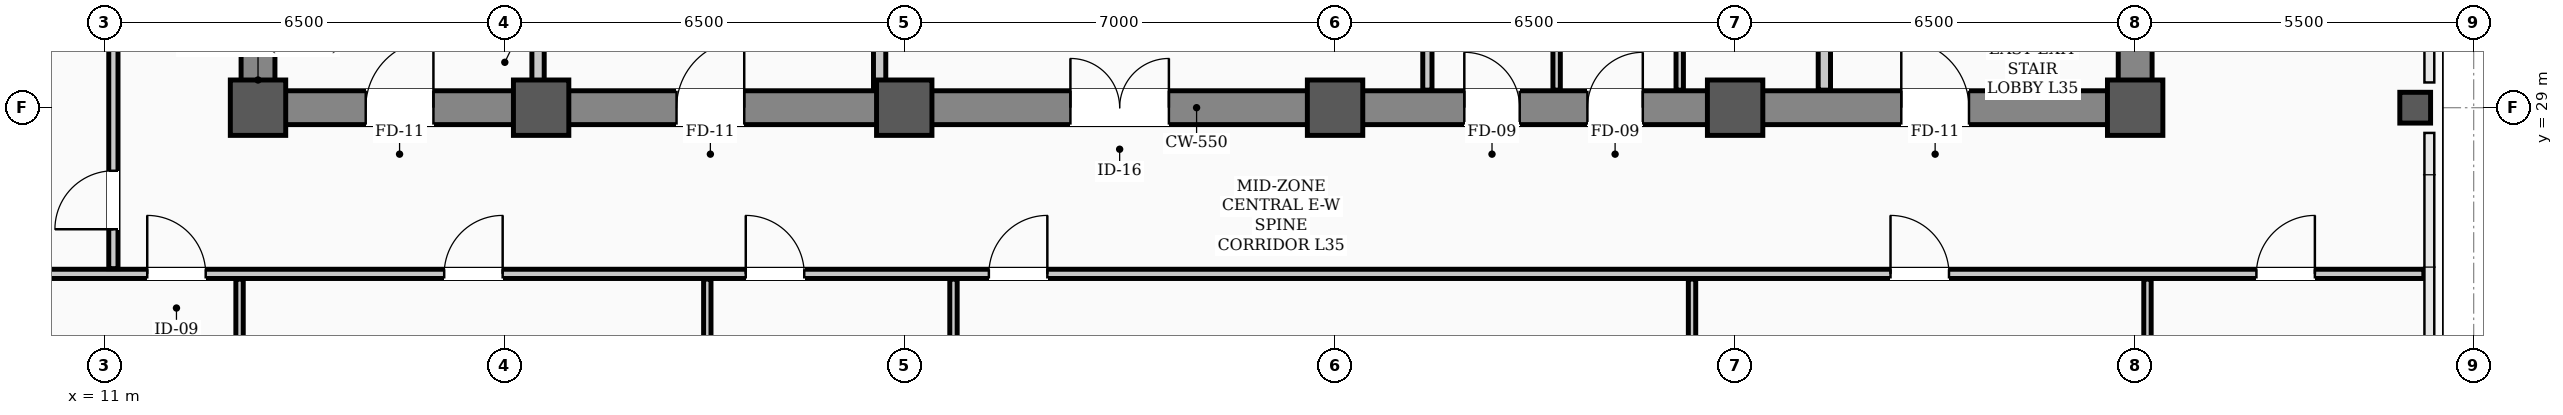
"""IFC4 building model, lengths in metres.
Left out: names, types, materials, properties, quantities, classifications, styles, units other than length and angle.
Written with IfcOpenShell. Run it as: python <this file> out.ifc"""

import sys

from ifc_helpers import new_model, si_unit, direction, frame, frame_2d, origin, origin_2d, place, context, subcontext, project, spatial, rectangle, hollow_rectangle, extrude, element, fill, save


model = new_model("IFC4")
c1 = context("Model", 3, precision=1e-05, world=origin(), true_north=direction((0.0, 1.0)))
c2 = subcontext(c1, "Body", "Model", "MODEL_VIEW")
j1 = project(units=[si_unit("LENGTHUNIT", "METRE"), si_unit("PLANEANGLEUNIT", "RADIAN")], contexts=[c1])
p1 = place(None, origin())
s1 = spatial("IfcSite", under=j1, at=p1, CompositionType="ELEMENT")
p2 = place(p1, origin())
s2 = spatial("IfcBuilding", under=s1, at=p2, CompositionType="ELEMENT")
p3 = place(p2, frame((0.0, 0.0, 142.2)))
s3 = spatial("IfcBuildingStorey", under=s2, at=p3, CompositionType="ELEMENT", Elevation=142.2)
for number, where, z_axis, x_axis in (
    (1, (13.5, 29.0, 0.0), (0.0, 0.0, 1.0), (1.0, 0.0, 0.0)),
    (2, (18.1, 29.0, 0.0), (0.0, 0.0, 1.0), (1.0, 0.0, 0.0)),
    (3, (24.0, 29.0, 0.0), (0.0, 0.0, 1.0), (1.0, 0.0, 0.0)),
    (4, (31.0, 29.0, 0.0), (0.0, 0.0, 1.0), (1.0, 0.0, 0.0)),
    (5, (37.5, 29.0, 0.0), (0.0, 0.0, 1.0), (1.0, 0.0, 0.0)),
    (6, (44.0, 29.0, 0.0), (0.0, 0.0, 1.0), (1.0, 0.0, 0.0)),
):
    element("IfcColumn", number, at=place(p3, frame(where, z_axis=z_axis, x_axis=x_axis)), inside=s3, PredefinedType="COLUMN", context=c2, shape_type="SweptSolid", body=[
        extrude(hollow_rectangle(XDim=0.9, YDim=0.9, WallThickness=0.035, InnerFilletRadius=0.017, OuterFilletRadius=0.052, at=origin_2d()), origin(), (0.0, 0.0, 1.0), 3.9),
    ])
p4 = place(p3, frame((48.55, 29.0, 0.0), z_axis=(0.0, 0.0, 1.0), x_axis=(1.0, 0.0, 0.0)))
e7 = element("IfcColumn", 7, at=p4, inside=s3, PredefinedType="COLUMN", context=c2, shape_type="SweptSolid", body=[
    extrude(hollow_rectangle(XDim=0.5, YDim=0.5, WallThickness=0.024, InnerFilletRadius=0.012, OuterFilletRadius=0.036, at=origin_2d()), origin(), (0.0, 0.0, 1.0), 3.9),
])
p5 = place(p3, frame((13.5, 29.0, 0.0), z_axis=(0.0, 0.0, 1.0), x_axis=(1.0, 0.0, 0.0)))
e8 = element("IfcWall", 8, at=p5, inside=s3, PredefinedType="SHEAR", context=c2, shape_type="SweptSolid", body=[
    extrude(rectangle(XDim=30.5, YDim=0.55, at=frame_2d((15.25, 0.0))), origin(), (0.0, 0.0, 1.0), 3.72),
])
p6 = place(p5, frame((1.75, 0.0, 0.0)))
e9 = element("IfcOpeningElement", 9, at=p6, cuts=e8, PredefinedType="OPENING", context=c2, shape_type="SweptSolid", body=[
    extrude(rectangle(XDim=1.1, YDim=2.08, at=frame_2d((0.55, 1.04))), frame((0.0, 0.285, 0.0), z_axis=(0.0, -1.0, 0.0), x_axis=(1.0, 0.0, 0.0)), (0.0, 0.0, 1.0), 0.57),
])
p7 = place(p5, frame((26.7, 0.0, 0.0)))
e10 = element("IfcOpeningElement", 10, at=p7, cuts=e8, PredefinedType="OPENING", context=c2, shape_type="SweptSolid", body=[
    extrude(rectangle(XDim=1.1, YDim=2.08, at=frame_2d((0.55, 1.04))), frame((0.0, 0.285, 0.0), z_axis=(0.0, -1.0, 0.0), x_axis=(1.0, 0.0, 0.0)), (0.0, 0.0, 1.0), 0.57),
])
p8 = place(p5, frame((6.8, 0.0, 0.0)))
e11 = element("IfcOpeningElement", 11, at=p8, cuts=e8, PredefinedType="OPENING", context=c2, shape_type="SweptSolid", body=[
    extrude(rectangle(XDim=1.1, YDim=2.08, at=frame_2d((0.55, 1.04))), frame((0.0, 0.285, 0.0), z_axis=(0.0, -1.0, 0.0), x_axis=(1.0, 0.0, 0.0)), (0.0, 0.0, 1.0), 0.57),
])
p9 = place(p5, frame((13.2, 0.0, 0.0)))
e12 = element("IfcOpeningElement", 12, at=p9, cuts=e8, PredefinedType="OPENING", context=c2, shape_type="SweptSolid", body=[
    extrude(rectangle(XDim=1.6, YDim=2.08, at=frame_2d((0.8, 1.04))), frame((0.0, 0.285, 0.0), z_axis=(0.0, -1.0, 0.0), x_axis=(1.0, 0.0, 0.0)), (0.0, 0.0, 1.0), 0.57),
])
p10 = place(p5, frame((19.6, 0.0, 0.0)))
e13 = element("IfcOpeningElement", 13, at=p10, cuts=e8, PredefinedType="OPENING", context=c2, shape_type="SweptSolid", body=[
    extrude(rectangle(XDim=0.9, YDim=2.08, at=frame_2d((0.45, 1.04))), frame((0.0, 0.285, 0.0), z_axis=(0.0, -1.0, 0.0), x_axis=(1.0, 0.0, 0.0)), (0.0, 0.0, 1.0), 0.57),
])
p11 = place(p5, frame((21.6, 0.0, 0.0)))
e14 = element("IfcOpeningElement", 14, at=p11, cuts=e8, PredefinedType="OPENING", context=c2, shape_type="SweptSolid", body=[
    extrude(rectangle(XDim=0.9, YDim=2.08, at=frame_2d((0.45, 1.04))), frame((0.0, 0.285, 0.0), z_axis=(0.0, -1.0, 0.0), x_axis=(1.0, 0.0, 0.0)), (0.0, 0.0, 1.0), 0.57),
])
for number, where, z_axis, x_axis in (
    (15, (13.5, 29.35, 0.0), (0.0, 0.0, 1.0), (0.0, 1.0, 0.0)),
    (16, (44.0, 29.35, 0.0), (0.0, 0.0, 1.0), (0.0, 1.0, 0.0)),
):
    element("IfcWall", number, at=place(p3, frame(where, z_axis=z_axis, x_axis=x_axis)), inside=s3, PredefinedType="SHEAR", context=c2, shape_type="SweptSolid", body=[
        extrude(rectangle(XDim=8.6, YDim=0.55, at=frame_2d((4.3, 0.0))), origin(), (0.0, 0.0, 1.0), 3.72),
    ])
p12 = place(p3, frame((2.31, 26.3, 0.0), z_axis=(0.0, 0.0, 1.0), x_axis=(1.0, 0.0, 0.0)))
e17 = element("IfcWall", 17, at=p12, inside=s3, PredefinedType="PARTITIONING", context=c2, shape_type="SweptSolid", body=[
    extrude(rectangle(XDim=46.38, YDim=0.15, at=frame_2d((23.19, 0.0))), origin(), (0.0, 0.0, 1.0), 3.1),
])
p13 = place(p12, frame((9.39, 0.0, 0.0)))
e18 = element("IfcOpeningElement", 18, at=p13, cuts=e17, PredefinedType="OPENING", context=c2, shape_type="SweptSolid", body=[
    extrude(rectangle(XDim=0.95, YDim=2.08, at=frame_2d((0.475, 1.04))), frame((0.0, 0.085, 0.0), z_axis=(0.0, -1.0, 0.0), x_axis=(1.0, 0.0, 0.0)), (0.0, 0.0, 1.0), 0.17),
])
p14 = place(p12, frame((14.215, 0.0, 0.0)))
e19 = element("IfcOpeningElement", 19, at=p14, cuts=e17, PredefinedType="OPENING", context=c2, shape_type="SweptSolid", body=[
    extrude(rectangle(XDim=0.95, YDim=2.08, at=frame_2d((0.475, 1.04))), frame((0.0, 0.085, 0.0), z_axis=(0.0, -1.0, 0.0), x_axis=(1.0, 0.0, 0.0)), (0.0, 0.0, 1.0), 0.17),
])
p15 = place(p12, frame((19.115, 0.0, 0.0)))
e20 = element("IfcOpeningElement", 20, at=p15, cuts=e17, PredefinedType="OPENING", context=c2, shape_type="SweptSolid", body=[
    extrude(rectangle(XDim=0.95, YDim=2.08, at=frame_2d((0.475, 1.04))), frame((0.0, 0.085, 0.0), z_axis=(0.0, -1.0, 0.0), x_axis=(1.0, 0.0, 0.0)), (0.0, 0.0, 1.0), 0.17),
])
p16 = place(p12, frame((23.065, 0.0, 0.0)))
e21 = element("IfcOpeningElement", 21, at=p16, cuts=e17, PredefinedType="OPENING", context=c2, shape_type="SweptSolid", body=[
    extrude(rectangle(XDim=0.95, YDim=2.08, at=frame_2d((0.475, 1.04))), frame((0.0, 0.085, 0.0), z_axis=(0.0, -1.0, 0.0), x_axis=(1.0, 0.0, 0.0)), (0.0, 0.0, 1.0), 0.17),
])
p17 = place(p12, frame((37.715, 0.0, 0.0)))
e22 = element("IfcOpeningElement", 22, at=p17, cuts=e17, PredefinedType="OPENING", context=c2, shape_type="SweptSolid", body=[
    extrude(rectangle(XDim=0.95, YDim=2.08, at=frame_2d((0.475, 1.04))), frame((0.0, 0.085, 0.0), z_axis=(0.0, -1.0, 0.0), x_axis=(1.0, 0.0, 0.0)), (0.0, 0.0, 1.0), 0.17),
])
p18 = place(p12, frame((43.66, 0.0, 0.0)))
e23 = element("IfcOpeningElement", 23, at=p18, cuts=e17, PredefinedType="OPENING", context=c2, shape_type="SweptSolid", body=[
    extrude(rectangle(XDim=0.95, YDim=2.08, at=frame_2d((0.475, 1.04))), frame((0.0, 0.085, 0.0), z_axis=(0.0, -1.0, 0.0), x_axis=(1.0, 0.0, 0.0)), (0.0, 0.0, 1.0), 0.17),
])
for number, where, z_axis, x_axis in (
    (24, (18.05, 29.285, 0.0), (0.0, 0.0, 1.0), (0.0, 1.0, 0.0)),
    (25, (38.95, 29.285, 0.0), (0.0, 0.0, 1.0), (0.0, 1.0, 0.0)),
):
    element("IfcWall", number, at=place(p3, frame(where, z_axis=z_axis, x_axis=x_axis)), inside=s3, PredefinedType="STANDARD", context=c2, shape_type="SweptSolid", body=[
        extrude(rectangle(XDim=1.015, YDim=0.2, at=frame_2d((0.508, 0.0))), origin(), (0.0, 0.0, 1.0), 3.3),
    ])
p19 = place(p3, frame((23.6, 29.285, 0.0), z_axis=(0.0, 0.0, 1.0), x_axis=(0.0, 1.0, 0.0)))
e26 = element("IfcWall", 26, at=p19, inside=s3, PredefinedType="STANDARD", context=c2, shape_type="SweptSolid", body=[
    extrude(rectangle(XDim=5.415, YDim=0.2, at=frame_2d((2.708, 0.0))), origin(), (0.0, 0.0, 1.0), 3.1),
])
p20 = place(p3, frame((32.5, 29.285, 0.0), z_axis=(0.0, 0.0, 1.0), x_axis=(0.0, 1.0, 0.0)))
e27 = element("IfcWall", 27, at=p20, inside=s3, PredefinedType="PARTITIONING", context=c2, shape_type="SweptSolid", body=[
    extrude(rectangle(XDim=2.48, YDim=0.15, at=frame_2d((1.24, 0.0))), origin(), (0.0, 0.0, 1.0), 3.3),
])
for number, where, z_axis, x_axis in (
    (28, (36.6, 29.285, 0.0), (0.0, 0.0, 1.0), (0.0, 1.0, 0.0)),
    (29, (34.6, 29.285, 0.0), (0.0, 0.0, 1.0), (0.0, 1.0, 0.0)),
):
    element("IfcWall", number, at=place(p3, frame(where, z_axis=z_axis, x_axis=x_axis)), inside=s3, PredefinedType="PARTITIONING", context=c2, shape_type="SweptSolid", body=[
        extrude(rectangle(XDim=2.48, YDim=0.12, at=frame_2d((1.24, 0.0))), origin(), (0.0, 0.0, 1.0), 3.3),
    ])
p21 = place(p3, frame((11.15, 26.385, 0.0), z_axis=(0.0, 0.0, 1.0), x_axis=(0.0, 1.0, 0.0)))
e30 = element("IfcWall", 30, at=p21, inside=s3, PredefinedType="PARTITIONING", context=c2, shape_type="SweptSolid", body=[
    extrude(rectangle(XDim=13.58, YDim=0.15, at=frame_2d((6.79, 0.0))), origin(), (0.0, 0.0, 1.0), 3.0),
])
p22 = place(p21, frame((0.64, 0.0, 0.0)))
e31 = element("IfcOpeningElement", 31, at=p22, cuts=e30, PredefinedType="OPENING", context=c2, shape_type="SweptSolid", body=[
    extrude(rectangle(XDim=0.95, YDim=2.08, at=frame_2d((0.475, 1.04))), frame((0.0, 0.085, 0.0), z_axis=(0.0, -1.0, 0.0), x_axis=(1.0, 0.0, 0.0)), (0.0, 0.0, 1.0), 0.17),
])
p23 = place(p21, frame((6.94, 0.0, 0.0)))
e32 = element("IfcOpeningElement", 32, at=p23, cuts=e30, PredefinedType="OPENING", context=c2, shape_type="SweptSolid", body=[
    extrude(rectangle(XDim=0.95, YDim=2.08, at=frame_2d((0.475, 1.04))), frame((0.0, 0.085, 0.0), z_axis=(0.0, -1.0, 0.0), x_axis=(1.0, 0.0, 0.0)), (0.0, 0.0, 1.0), 0.17),
])
p24 = place(p21, frame((11.065, 0.0, 0.0)))
e33 = element("IfcOpeningElement", 33, at=p24, cuts=e30, PredefinedType="OPENING", context=c2, shape_type="SweptSolid", body=[
    extrude(rectangle(XDim=0.95, YDim=2.08, at=frame_2d((0.475, 1.04))), frame((0.0, 0.085, 0.0), z_axis=(0.0, -1.0, 0.0), x_axis=(1.0, 0.0, 0.0)), (0.0, 0.0, 1.0), 0.17),
])
for number, where, z_axis, x_axis in (
    (34, (13.2, 16.31, 0.0), (0.0, 0.0, 1.0), (0.0, 1.0, 0.0)),
    (35, (20.8, 16.31, 0.0), (0.0, 0.0, 1.0), (0.0, 1.0, 0.0)),
):
    element("IfcWall", number, at=place(p3, frame(where, z_axis=z_axis, x_axis=x_axis)), inside=s3, PredefinedType="PARTITIONING", context=c2, shape_type="SweptSolid", body=[
        extrude(rectangle(XDim=9.905, YDim=0.12, at=frame_2d((4.953, 0.0))), origin(), (0.0, 0.0, 1.0), 3.0),
    ])
p25 = place(p3, frame((24.8, 18.07, 0.0), z_axis=(0.0, 0.0, 1.0), x_axis=(0.0, 1.0, 0.0)))
e36 = element("IfcWall", 36, at=p25, inside=s3, PredefinedType="PARTITIONING", context=c2, shape_type="SweptSolid", body=[
    extrude(rectangle(XDim=8.145, YDim=0.12, at=frame_2d((4.073, 0.0))), origin(), (0.0, 0.0, 1.0), 3.0),
])
for number, where, z_axis, x_axis in (
    (37, (36.8, 16.31, 0.0), (0.0, 0.0, 1.0), (0.0, 1.0, 0.0)),
    (38, (44.2, 16.31, 0.0), (0.0, 0.0, 1.0), (0.0, 1.0, 0.0)),
):
    element("IfcWall", number, at=place(p3, frame(where, z_axis=z_axis, x_axis=x_axis)), inside=s3, PredefinedType="PARTITIONING", context=c2, shape_type="SweptSolid", body=[
        extrude(rectangle(XDim=9.905, YDim=0.12, at=frame_2d((4.953, 0.0))), origin(), (0.0, 0.0, 1.0), 3.0),
    ])
p26 = place(p6, origin())
e39 = element("IfcDoor", 39, at=p26, inside=s3, OperationType="SINGLE_SWING_RIGHT", PredefinedType="DOOR", context=c2, shape_type="SweptSolid", body=[
    extrude(rectangle(XDim=1.1, YDim=2.08, at=frame_2d((0.55, 1.04))), frame((0.0, 0.025, 0.0), z_axis=(0.0, -1.0, 0.0), x_axis=(1.0, 0.0, 0.0)), (0.0, 0.0, 1.0), 0.05),
])
fill(e9, e39)
p27 = place(p7, origin())
e40 = element("IfcDoor", 40, at=p27, inside=s3, OperationType="SINGLE_SWING_LEFT", PredefinedType="DOOR", context=c2, shape_type="SweptSolid", body=[
    extrude(rectangle(XDim=1.1, YDim=2.08, at=frame_2d((0.55, 1.04))), frame((0.0, 0.025, 0.0), z_axis=(0.0, -1.0, 0.0), x_axis=(1.0, 0.0, 0.0)), (0.0, 0.0, 1.0), 0.05),
])
fill(e10, e40)
p28 = place(p8, origin())
e41 = element("IfcDoor", 41, at=p28, inside=s3, OperationType="SINGLE_SWING_RIGHT", PredefinedType="DOOR", context=c2, shape_type="SweptSolid", body=[
    extrude(rectangle(XDim=1.1, YDim=2.08, at=frame_2d((0.55, 1.04))), frame((0.0, 0.025, 0.0), z_axis=(0.0, -1.0, 0.0), x_axis=(1.0, 0.0, 0.0)), (0.0, 0.0, 1.0), 0.05),
])
fill(e11, e41)
p29 = place(p9, origin())
e42 = element("IfcDoor", 42, at=p29, inside=s3, OperationType="DOUBLE_DOOR_SINGLE_SWING", PredefinedType="DOOR", context=c2, shape_type="SweptSolid", body=[
    extrude(rectangle(XDim=1.6, YDim=2.08, at=frame_2d((0.8, 1.04))), frame((0.0, 0.025, 0.0), z_axis=(0.0, -1.0, 0.0), x_axis=(1.0, 0.0, 0.0)), (0.0, 0.0, 1.0), 0.05),
])
fill(e12, e42)
p30 = place(p10, origin())
e43 = element("IfcDoor", 43, at=p30, inside=s3, OperationType="SINGLE_SWING_LEFT", PredefinedType="DOOR", context=c2, shape_type="SweptSolid", body=[
    extrude(rectangle(XDim=0.9, YDim=2.08, at=frame_2d((0.45, 1.04))), frame((0.0, 0.025, 0.0), z_axis=(0.0, -1.0, 0.0), x_axis=(1.0, 0.0, 0.0)), (0.0, 0.0, 1.0), 0.05),
])
fill(e13, e43)
p31 = place(p11, origin())
e44 = element("IfcDoor", 44, at=p31, inside=s3, OperationType="SINGLE_SWING_RIGHT", PredefinedType="DOOR", context=c2, shape_type="SweptSolid", body=[
    extrude(rectangle(XDim=0.9, YDim=2.08, at=frame_2d((0.45, 1.04))), frame((0.0, 0.025, 0.0), z_axis=(0.0, -1.0, 0.0), x_axis=(1.0, 0.0, 0.0)), (0.0, 0.0, 1.0), 0.05),
])
fill(e14, e44)
p32 = place(p13, origin())
e45 = element("IfcDoor", 45, at=p32, inside=s3, OperationType="SINGLE_SWING_LEFT", PredefinedType="DOOR", context=c2, shape_type="SweptSolid", body=[
    extrude(rectangle(XDim=0.95, YDim=2.08, at=frame_2d((0.475, 1.04))), frame((0.0, 0.025, 0.0), z_axis=(0.0, -1.0, 0.0), x_axis=(1.0, 0.0, 0.0)), (0.0, 0.0, 1.0), 0.05),
])
fill(e18, e45)
p33 = place(p14, origin())
e46 = element("IfcDoor", 46, at=p33, inside=s3, OperationType="SINGLE_SWING_RIGHT", PredefinedType="DOOR", context=c2, shape_type="SweptSolid", body=[
    extrude(rectangle(XDim=0.95, YDim=2.08, at=frame_2d((0.475, 1.04))), frame((0.0, 0.025, 0.0), z_axis=(0.0, -1.0, 0.0), x_axis=(1.0, 0.0, 0.0)), (0.0, 0.0, 1.0), 0.05),
])
fill(e19, e46)
p34 = place(p15, origin())
e47 = element("IfcDoor", 47, at=p34, inside=s3, OperationType="SINGLE_SWING_LEFT", PredefinedType="DOOR", context=c2, shape_type="SweptSolid", body=[
    extrude(rectangle(XDim=0.95, YDim=2.08, at=frame_2d((0.475, 1.04))), frame((0.0, 0.025, 0.0), z_axis=(0.0, -1.0, 0.0), x_axis=(1.0, 0.0, 0.0)), (0.0, 0.0, 1.0), 0.05),
])
fill(e20, e47)
p35 = place(p16, origin())
e48 = element("IfcDoor", 48, at=p35, inside=s3, OperationType="SINGLE_SWING_RIGHT", PredefinedType="DOOR", context=c2, shape_type="SweptSolid", body=[
    extrude(rectangle(XDim=0.95, YDim=2.08, at=frame_2d((0.475, 1.04))), frame((0.0, 0.025, 0.0), z_axis=(0.0, -1.0, 0.0), x_axis=(1.0, 0.0, 0.0)), (0.0, 0.0, 1.0), 0.05),
])
fill(e21, e48)
p36 = place(p17, origin())
e49 = element("IfcDoor", 49, at=p36, inside=s3, OperationType="SINGLE_SWING_LEFT", PredefinedType="DOOR", context=c2, shape_type="SweptSolid", body=[
    extrude(rectangle(XDim=0.95, YDim=2.08, at=frame_2d((0.475, 1.04))), frame((0.0, 0.025, 0.0), z_axis=(0.0, -1.0, 0.0), x_axis=(1.0, 0.0, 0.0)), (0.0, 0.0, 1.0), 0.05),
])
fill(e22, e49)
p37 = place(p18, origin())
e50 = element("IfcDoor", 50, at=p37, inside=s3, OperationType="SINGLE_SWING_RIGHT", PredefinedType="DOOR", context=c2, shape_type="SweptSolid", body=[
    extrude(rectangle(XDim=0.95, YDim=2.08, at=frame_2d((0.475, 1.04))), frame((0.0, 0.025, 0.0), z_axis=(0.0, -1.0, 0.0), x_axis=(1.0, 0.0, 0.0)), (0.0, 0.0, 1.0), 0.05),
])
fill(e23, e50)
p38 = place(p22, origin())
e51 = element("IfcDoor", 51, at=p38, inside=s3, OperationType="SINGLE_SWING_LEFT", PredefinedType="DOOR", context=c2, shape_type="SweptSolid", body=[
    extrude(rectangle(XDim=0.95, YDim=2.08, at=frame_2d((0.475, 1.04))), frame((0.0, 0.025, 0.0), z_axis=(0.0, -1.0, 0.0), x_axis=(1.0, 0.0, 0.0)), (0.0, 0.0, 1.0), 0.05),
])
fill(e31, e51)
save(model, sys.argv[1])
